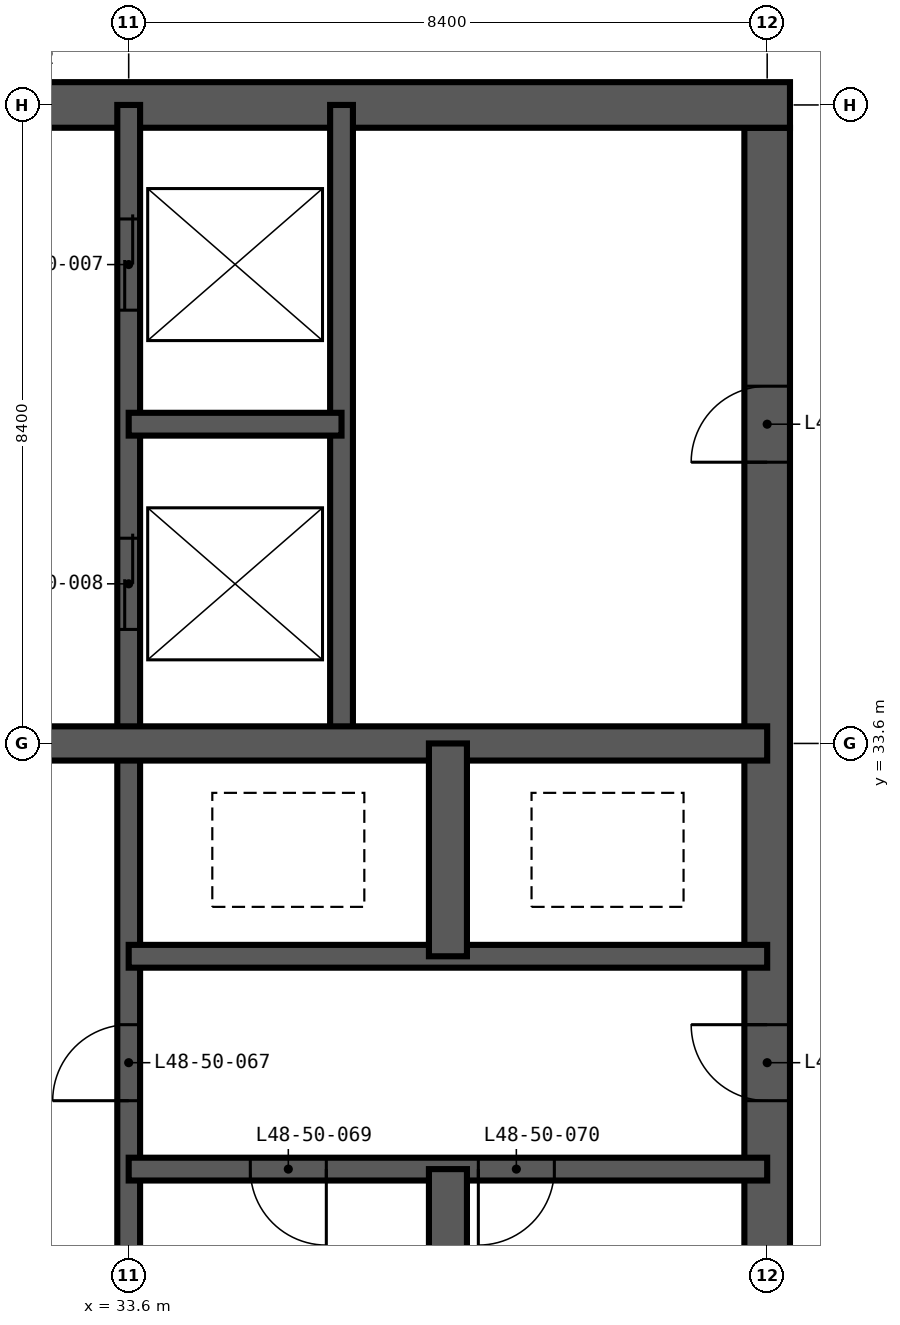
"""IFC4 building model, lengths in metres.
Left out: names, types, materials, properties, quantities, classifications, styles, units other than length and angle.
Written with IfcOpenShell. Run it as: python <this file> out.ifc"""

import sys

from ifc_helpers import new_model, si_unit, direction, frame, frame_2d, origin, place, context, subcontext, project, spatial, rectangle, extrude, element, fill, save


model = new_model("IFC4")
c1 = context("Model", 3, precision=1e-05, world=origin(), true_north=direction((0.0, 1.0)))
c2 = subcontext(c1, "Body", "Model", "MODEL_VIEW")
j1 = project(units=[si_unit("LENGTHUNIT", "METRE"), si_unit("PLANEANGLEUNIT", "RADIAN")], contexts=[c1])
p1 = place(None, origin())
s1 = spatial("IfcSite", under=j1, at=p1, CompositionType="ELEMENT")
p2 = place(p1, origin())
s2 = spatial("IfcBuilding", under=s1, at=p2, CompositionType="ELEMENT")
p3 = place(p2, frame((0.0, 0.0, 187.8)))
s3 = spatial("IfcBuildingStorey", under=s2, at=p3, CompositionType="ELEMENT", Elevation=187.8)
p4 = place(p3, frame((42.0, 17.1, -0.35), z_axis=(0.0, 0.0, 1.0), x_axis=(0.0, 1.0, 0.0)))
e1 = element("IfcWall", 1, at=p4, inside=s3, PredefinedType="SHEAR", context=c2, shape_type="SweptSolid", body=[
    extrude(rectangle(XDim=24.6, YDim=0.6, at=frame_2d((12.3, 0.0))), origin(), (0.0, 0.0, 1.0), 3.6),
])
p5 = place(p4, frame((0.5, 0.0, 0.35)))
e2 = element("IfcOpeningElement", 2, at=p5, cuts=e1, PredefinedType="OPENING", context=c2, shape_type="SweptSolid", body=[
    extrude(rectangle(XDim=1.2, YDim=2.2, at=frame_2d((0.6, 1.1))), frame((0.0, 0.31, 0.0), z_axis=(0.0, -1.0, 0.0), x_axis=(1.0, 0.0, 0.0)), (0.0, 0.0, 1.0), 0.62),
])
p6 = place(p4, frame((11.8, 0.0, 0.35)))
e3 = element("IfcOpeningElement", 3, at=p6, cuts=e1, PredefinedType="OPENING", context=c2, shape_type="SweptSolid", body=[
    extrude(rectangle(XDim=1.0, YDim=2.1, at=frame_2d((0.5, 1.05))), frame((0.0, 0.31, 0.0), z_axis=(0.0, -1.0, 0.0), x_axis=(1.0, 0.0, 0.0)), (0.0, 0.0, 1.0), 0.62),
])
p7 = place(p4, frame((20.2, 0.0, 0.35)))
e4 = element("IfcOpeningElement", 4, at=p7, cuts=e1, PredefinedType="OPENING", context=c2, shape_type="SweptSolid", body=[
    extrude(rectangle(XDim=1.0, YDim=2.1, at=frame_2d((0.5, 1.05))), frame((0.0, 0.31, 0.0), z_axis=(0.0, -1.0, 0.0), x_axis=(1.0, 0.0, 0.0)), (0.0, 0.0, 1.0), 0.62),
])
p8 = place(p3, frame((42.3, 42.0, -0.35), z_axis=(0.0, 0.0, 1.0), x_axis=(-1.0, 0.0, 0.0)))
e5 = element("IfcWall", 5, at=p8, inside=s3, PredefinedType="SHEAR", context=c2, shape_type="SweptSolid", body=[
    extrude(rectangle(XDim=25.8, YDim=0.6, at=frame_2d((12.9, 0.0))), origin(), (0.0, 0.0, 1.0), 3.6),
])
p9 = place(p8, frame((20.8, 0.0, 0.35)))
e6 = element("IfcOpeningElement", 6, at=p9, cuts=e5, PredefinedType="OPENING", context=c2, shape_type="SweptSolid", body=[
    extrude(rectangle(XDim=1.0, YDim=2.1, at=frame_2d((0.5, 1.05))), frame((0.0, 0.31, 0.0), z_axis=(0.0, -1.0, 0.0), x_axis=(1.0, 0.0, 0.0)), (0.0, 0.0, 1.0), 0.62),
])
p10 = place(p8, frame((10.2, 0.0, 0.35)))
e7 = element("IfcOpeningElement", 7, at=p10, cuts=e5, PredefinedType="OPENING", context=c2, shape_type="SweptSolid", body=[
    extrude(rectangle(XDim=1.2, YDim=2.2, at=frame_2d((0.6, 1.1))), frame((0.0, 0.31, 0.0), z_axis=(0.0, -1.0, 0.0), x_axis=(1.0, 0.0, 0.0)), (0.0, 0.0, 1.0), 0.62),
])
p11 = place(p3, frame((33.6, 16.8, -0.35), z_axis=(0.0, 0.0, 1.0), x_axis=(0.0, 1.0, 0.0)))
e8 = element("IfcWall", 8, at=p11, inside=s3, PredefinedType="SHEAR", context=c2, shape_type="SweptSolid", body=[
    extrude(rectangle(XDim=25.2, YDim=0.3, at=frame_2d((12.6, 0.0))), origin(), (0.0, 0.0, 1.0), 3.6),
])
p12 = place(p11, frame((22.5, 0.0, 0.35)))
e9 = element("IfcOpeningElement", 9, at=p12, cuts=e8, PredefinedType="OPENING", context=c2, shape_type="SweptSolid", body=[
    extrude(rectangle(XDim=1.2, YDim=2.2, at=frame_2d((0.6, 1.1))), frame((0.0, 0.16, 0.0), z_axis=(0.0, -1.0, 0.0), x_axis=(1.0, 0.0, 0.0)), (0.0, 0.0, 1.0), 0.32),
])
p13 = place(p11, frame((18.3, 0.0, 0.35)))
e10 = element("IfcOpeningElement", 10, at=p13, cuts=e8, PredefinedType="OPENING", context=c2, shape_type="SweptSolid", body=[
    extrude(rectangle(XDim=1.2, YDim=2.2, at=frame_2d((0.6, 1.1))), frame((0.0, 0.16, 0.0), z_axis=(0.0, -1.0, 0.0), x_axis=(1.0, 0.0, 0.0)), (0.0, 0.0, 1.0), 0.32),
])
p14 = place(p11, frame((12.1, 0.0, 0.35)))
e11 = element("IfcOpeningElement", 11, at=p14, cuts=e8, PredefinedType="OPENING", context=c2, shape_type="SweptSolid", body=[
    extrude(rectangle(XDim=1.0, YDim=2.1, at=frame_2d((0.5, 1.05))), frame((0.0, 0.16, 0.0), z_axis=(0.0, -1.0, 0.0), x_axis=(1.0, 0.0, 0.0)), (0.0, 0.0, 1.0), 0.32),
])
p15 = place(p3, frame((36.4, 33.6, -0.35), z_axis=(0.0, 0.0, 1.0), x_axis=(0.0, 1.0, 0.0)))
e12 = element("IfcWall", 12, at=p15, inside=s3, PredefinedType="SHEAR", context=c2, shape_type="SweptSolid", body=[
    extrude(rectangle(XDim=8.4, YDim=0.3, at=frame_2d((4.2, 0.0))), origin(), (0.0, 0.0, 1.0), 3.6),
])
p16 = place(p3, frame((33.6, 28.0, -0.35), z_axis=(0.0, 0.0, 1.0), x_axis=(1.0, 0.0, 0.0)))
e13 = element("IfcWall", 13, at=p16, inside=s3, PredefinedType="SHEAR", context=c2, shape_type="SweptSolid", body=[
    extrude(rectangle(XDim=8.4, YDim=0.3, at=frame_2d((4.2, 0.0))), origin(), (0.0, 0.0, 1.0), 3.6),
])
p17 = place(p16, frame((1.6, 0.0, 0.35)))
e14 = element("IfcOpeningElement", 14, at=p17, cuts=e13, PredefinedType="OPENING", context=c2, shape_type="SweptSolid", body=[
    extrude(rectangle(XDim=1.0, YDim=2.1, at=frame_2d((0.5, 1.05))), frame((0.0, 0.16, 0.0), z_axis=(0.0, -1.0, 0.0), x_axis=(1.0, 0.0, 0.0)), (0.0, 0.0, 1.0), 0.32),
])
p18 = place(p16, frame((4.6, 0.0, 0.35)))
e15 = element("IfcOpeningElement", 15, at=p18, cuts=e13, PredefinedType="OPENING", context=c2, shape_type="SweptSolid", body=[
    extrude(rectangle(XDim=1.0, YDim=2.1, at=frame_2d((0.5, 1.05))), frame((0.0, 0.16, 0.0), z_axis=(0.0, -1.0, 0.0), x_axis=(1.0, 0.0, 0.0)), (0.0, 0.0, 1.0), 0.32),
])
p19 = place(p3, frame((33.6, 30.8, -0.35), z_axis=(0.0, 0.0, 1.0), x_axis=(1.0, 0.0, 0.0)))
e16 = element("IfcWall", 16, at=p19, inside=s3, PredefinedType="SHEAR", context=c2, shape_type="SweptSolid", body=[
    extrude(rectangle(XDim=8.4, YDim=0.3, at=frame_2d((4.2, 0.0))), origin(), (0.0, 0.0, 1.0), 3.6),
])
p20 = place(p3, frame((33.6, 37.8, -0.35), z_axis=(0.0, 0.0, 1.0), x_axis=(1.0, 0.0, 0.0)))
e17 = element("IfcWall", 17, at=p20, inside=s3, PredefinedType="SHEAR", context=c2, shape_type="SweptSolid", body=[
    extrude(rectangle(XDim=2.8, YDim=0.3, at=frame_2d((1.4, 0.0))), origin(), (0.0, 0.0, 1.0), 3.6),
])
p21 = place(p3, frame((16.8, 33.6, -0.35), z_axis=(0.0, 0.0, 1.0), x_axis=(1.0, 0.0, 0.0)))
e18 = element("IfcWall", 18, at=p21, inside=s3, PredefinedType="SHEAR", context=c2, shape_type="SweptSolid", body=[
    extrude(rectangle(XDim=25.2, YDim=0.45, at=frame_2d((12.6, 0.0))), origin(), (0.0, 0.0, 1.0), 3.6),
])
p22 = place(p3, frame((37.8, 16.8, -0.35), z_axis=(0.0, 0.0, 1.0), x_axis=(0.0, 1.0, 0.0)))
e19 = element("IfcWall", 19, at=p22, inside=s3, PredefinedType="SHEAR", context=c2, shape_type="SweptSolid", body=[
    extrude(rectangle(XDim=11.2, YDim=0.5, at=frame_2d((5.6, 0.0))), origin(), (0.0, 0.0, 1.0), 3.6),
])
p23 = place(p3, frame((37.8, 30.8, -0.35), z_axis=(0.0, 0.0, 1.0), x_axis=(0.0, 1.0, 0.0)))
e20 = element("IfcWall", 20, at=p23, inside=s3, PredefinedType="SHEAR", context=c2, shape_type="SweptSolid", body=[
    extrude(rectangle(XDim=2.8, YDim=0.5, at=frame_2d((1.4, 0.0))), origin(), (0.0, 0.0, 1.0), 3.6),
])
p24 = place(p12, origin())
e21 = element("IfcDoor", 21, at=p24, inside=s3, OperationType="DOUBLE_DOOR_SLIDING", PredefinedType="DOOR", context=c2, shape_type="SweptSolid", body=[
    extrude(rectangle(XDim=1.2, YDim=2.2, at=frame_2d((0.6, 1.1))), frame((0.0, 0.025, 0.0), z_axis=(0.0, -1.0, 0.0), x_axis=(1.0, 0.0, 0.0)), (0.0, 0.0, 1.0), 0.05),
])
fill(e9, e21)
p25 = place(p13, origin())
e22 = element("IfcDoor", 22, at=p25, inside=s3, OperationType="DOUBLE_DOOR_SLIDING", PredefinedType="DOOR", context=c2, shape_type="SweptSolid", body=[
    extrude(rectangle(XDim=1.2, YDim=2.2, at=frame_2d((0.6, 1.1))), frame((0.0, 0.025, 0.0), z_axis=(0.0, -1.0, 0.0), x_axis=(1.0, 0.0, 0.0)), (0.0, 0.0, 1.0), 0.05),
])
fill(e10, e22)
p26 = place(p14, origin())
e23 = element("IfcDoor", 23, at=p26, inside=s3, OperationType="SINGLE_SWING_LEFT", PredefinedType="DOOR", context=c2, shape_type="SweptSolid", body=[
    extrude(rectangle(XDim=1.0, YDim=2.1, at=frame_2d((0.5, 1.05))), frame((0.0, 0.025, 0.0), z_axis=(0.0, -1.0, 0.0), x_axis=(1.0, 0.0, 0.0)), (0.0, 0.0, 1.0), 0.05),
])
fill(e11, e23)
p27 = place(p17, frame((1.0, 0.0, 0.0), z_axis=(0.0, 0.0, 1.0), x_axis=(-1.0, 0.0, 0.0)))
e24 = element("IfcDoor", 24, at=p27, inside=s3, OperationType="SINGLE_SWING_LEFT", PredefinedType="DOOR", context=c2, shape_type="SweptSolid", body=[
    extrude(rectangle(XDim=1.0, YDim=2.1, at=frame_2d((0.5, 1.05))), frame((0.0, 0.025, 0.0), z_axis=(0.0, -1.0, 0.0), x_axis=(1.0, 0.0, 0.0)), (0.0, 0.0, 1.0), 0.05),
])
fill(e14, e24)
p28 = place(p18, frame((1.0, 0.0, 0.0), z_axis=(0.0, 0.0, 1.0), x_axis=(-1.0, 0.0, 0.0)))
e25 = element("IfcDoor", 25, at=p28, inside=s3, OperationType="SINGLE_SWING_RIGHT", PredefinedType="DOOR", context=c2, shape_type="SweptSolid", body=[
    extrude(rectangle(XDim=1.0, YDim=2.1, at=frame_2d((0.5, 1.05))), frame((0.0, 0.025, 0.0), z_axis=(0.0, -1.0, 0.0), x_axis=(1.0, 0.0, 0.0)), (0.0, 0.0, 1.0), 0.05),
])
fill(e15, e25)
p29 = place(p6, origin())
e26 = element("IfcDoor", 26, at=p29, inside=s3, OperationType="SINGLE_SWING_RIGHT", PredefinedType="DOOR", context=c2, shape_type="SweptSolid", body=[
    extrude(rectangle(XDim=1.0, YDim=2.1, at=frame_2d((0.5, 1.05))), frame((0.0, 0.025, 0.0), z_axis=(0.0, -1.0, 0.0), x_axis=(1.0, 0.0, 0.0)), (0.0, 0.0, 1.0), 0.05),
])
fill(e3, e26)
p30 = place(p7, origin())
e27 = element("IfcDoor", 27, at=p30, inside=s3, OperationType="SINGLE_SWING_LEFT", PredefinedType="DOOR", context=c2, shape_type="SweptSolid", body=[
    extrude(rectangle(XDim=1.0, YDim=2.1, at=frame_2d((0.5, 1.05))), frame((0.0, 0.025, 0.0), z_axis=(0.0, -1.0, 0.0), x_axis=(1.0, 0.0, 0.0)), (0.0, 0.0, 1.0), 0.05),
])
fill(e4, e27)
save(model, sys.argv[1])
